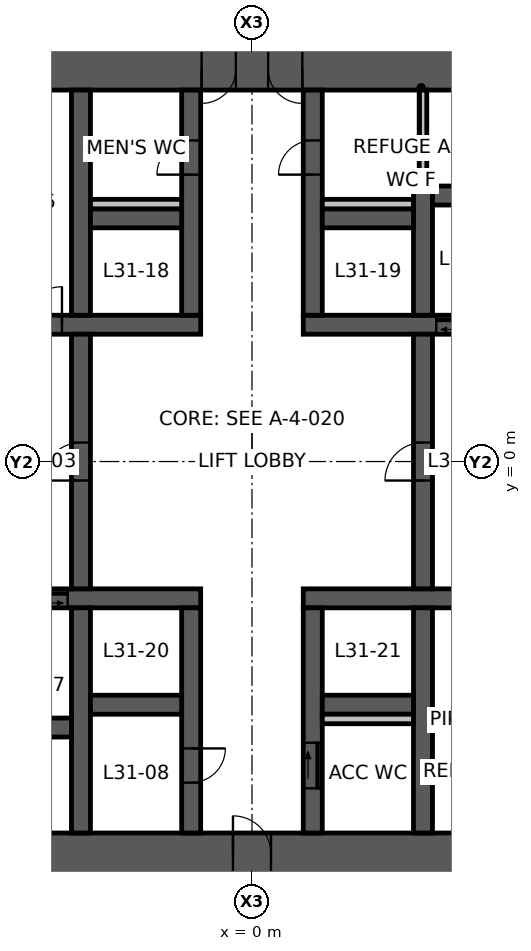
"""IFC4 building model, lengths in metres.
Left out: names, types, materials, properties, quantities, classifications, styles, units other than length and angle.
Written with IfcOpenShell. Run it as: python <this file> out.ifc"""

import sys

from ifc_helpers import new_model, si_unit, direction, frame, frame_2d, origin, place, context, subcontext, project, spatial, polyline, rectangle, outline, extrude, element, fill, save


model = new_model("IFC4")
c1 = context("Model", 3, precision=1e-05, world=origin(), true_north=direction((0.0, 1.0)))
c2 = subcontext(c1, "Body", "Model", "MODEL_VIEW")
j1 = project(units=[si_unit("LENGTHUNIT", "METRE"), si_unit("PLANEANGLEUNIT", "RADIAN")], contexts=[c1])
p1 = place(None, origin())
s1 = spatial("IfcSite", under=j1, at=p1, CompositionType="ELEMENT")
p2 = place(p1, origin())
s2 = spatial("IfcBuilding", under=s1, at=p2, CompositionType="ELEMENT")
p3 = place(p2, frame((0.0, 0.0, 123.6)))
s3 = spatial("IfcBuildingStorey", under=s2, at=p3, CompositionType="ELEMENT", Elevation=123.6)
p4 = place(p3, frame((5.961, 10.325, 0.0), z_axis=(0.0, 0.0, 1.0), x_axis=(-1.0, 0.0, 0.0)))
e1 = element("IfcWall", 1, at=p4, inside=s3, PredefinedType="SHEAR", context=c2, shape_type="SweptSolid", body=[
    extrude(outline(polyline([(-0.318, -0.55), (4.636, -0.55), (5.536, -0.55), (6.386, -0.55), (7.286, -0.55), (12.24, -0.55), (11.605, 0.55), (7.286, 0.55), (6.386, 0.55), (5.536, 0.55), (4.636, 0.55), (0.318, 0.55), (-0.318, -0.55)])), origin(), (0.0, 0.0, 1.0), 5.0),
])
p5 = place(p4, frame((6.386, 0.0, 0.0)))
e2 = element("IfcOpeningElement", 2, at=p5, cuts=e1, PredefinedType="OPENING", context=c2, shape_type="SweptSolid", body=[
    extrude(rectangle(XDim=0.9, YDim=2.1, at=frame_2d((0.45, 1.05))), frame((0.0, 0.56, 0.0), z_axis=(0.0, -1.0, 0.0), x_axis=(1.0, 0.0, 0.0)), (0.0, 0.0, 1.0), 1.12),
])
p6 = place(p4, frame((4.636, 0.0, 0.0)))
e3 = element("IfcOpeningElement", 3, at=p6, cuts=e1, PredefinedType="OPENING", context=c2, shape_type="SweptSolid", body=[
    extrude(rectangle(XDim=0.9, YDim=2.1, at=frame_2d((0.45, 1.05))), frame((0.0, 0.56, 0.0), z_axis=(0.0, -1.0, 0.0), x_axis=(1.0, 0.0, 0.0)), (0.0, 0.0, 1.0), 1.12),
])
p7 = place(p3, frame((-5.961, -10.325, 0.0), z_axis=(0.0, 0.0, 1.0), x_axis=(1.0, 0.0, 0.0)))
e4 = element("IfcWall", 4, at=p7, inside=s3, PredefinedType="SHEAR", context=c2, shape_type="SweptSolid", body=[
    extrude(outline(polyline([(-0.318, -0.55), (5.461, -0.55), (6.461, -0.55), (12.24, -0.55), (11.605, 0.55), (6.461, 0.55), (5.461, 0.55), (0.318, 0.55), (-0.318, -0.55)])), origin(), (0.0, 0.0, 1.0), 5.0),
])
p8 = place(p7, frame((5.461, 0.0, 0.0)))
e5 = element("IfcOpeningElement", 5, at=p8, cuts=e4, PredefinedType="OPENING", context=c2, shape_type="SweptSolid", body=[
    extrude(rectangle(XDim=1.0, YDim=2.1, at=frame_2d((0.5, 1.05))), frame((0.0, 0.56, 0.0), z_axis=(0.0, -1.0, 0.0), x_axis=(1.0, 0.0, 0.0)), (0.0, 0.0, 1.0), 1.12),
])
p9 = place(p3, frame((-9.209, 3.6, 0.0), z_axis=(0.0, 0.0, 1.0), x_axis=(1.0, 0.0, 0.0)))
e6 = element("IfcWall", 6, at=p9, inside=s3, PredefinedType="SHEAR", context=c2, shape_type="SweptSolid", body=[
    extrude(outline(polyline([(-0.144, -0.25), (3.209, -0.25), (4.209, -0.25), (7.859, -0.25), (7.859, 0.25), (4.209, 0.25), (3.209, 0.25), (0.144, 0.25), (-0.144, -0.25)])), origin(), (0.0, 0.0, 1.0), 5.0),
])
p10 = place(p9, frame((3.209, 0.0, 0.0)))
e7 = element("IfcOpeningElement", 7, at=p10, cuts=e6, PredefinedType="OPENING", context=c2, shape_type="SweptSolid", body=[
    extrude(rectangle(XDim=1.0, YDim=2.1, at=frame_2d((0.5, 1.05))), frame((0.0, 0.26, 0.0), z_axis=(0.0, -1.0, 0.0), x_axis=(1.0, 0.0, 0.0)), (0.0, 0.0, 1.0), 0.52),
])
p11 = place(p3, frame((1.35, 3.6, 0.0), z_axis=(0.0, 0.0, 1.0), x_axis=(1.0, 0.0, 0.0)))
e8 = element("IfcWall", 8, at=p11, inside=s3, PredefinedType="SHEAR", context=c2, shape_type="SweptSolid", body=[
    extrude(outline(polyline([(0.0, -0.25), (3.5, -0.25), (4.8, -0.25), (8.003, -0.25), (7.714, 0.25), (4.8, 0.25), (3.5, 0.25), (0.0, 0.25), (0.0, -0.25)])), origin(), (0.0, 0.0, 1.0), 5.0),
])
p12 = place(p11, frame((3.5, 0.0, 0.0)))
e9 = element("IfcOpeningElement", 9, at=p12, cuts=e8, PredefinedType="OPENING", context=c2, shape_type="SweptSolid", body=[
    extrude(rectangle(XDim=1.3, YDim=2.1, at=frame_2d((0.65, 1.05))), frame((0.0, 0.26, 0.0), z_axis=(0.0, -1.0, 0.0), x_axis=(1.0, 0.0, 0.0)), (0.0, 0.0, 1.0), 0.52),
])
p13 = place(p3, frame((-9.209, -3.6, 0.0), z_axis=(0.0, 0.0, 1.0), x_axis=(1.0, 0.0, 0.0)))
e10 = element("IfcWall", 10, at=p13, inside=s3, PredefinedType="SHEAR", context=c2, shape_type="SweptSolid", body=[
    extrude(outline(polyline([(0.144, -0.25), (3.059, -0.25), (4.359, -0.25), (7.859, -0.25), (7.859, 0.25), (4.359, 0.25), (3.059, 0.25), (-0.144, 0.25), (0.144, -0.25)])), origin(), (0.0, 0.0, 1.0), 5.0),
])
p14 = place(p13, frame((3.059, 0.0, 0.0)))
e11 = element("IfcOpeningElement", 11, at=p14, cuts=e10, PredefinedType="OPENING", context=c2, shape_type="SweptSolid", body=[
    extrude(rectangle(XDim=1.3, YDim=2.1, at=frame_2d((0.65, 1.05))), frame((0.0, 0.26, 0.0), z_axis=(0.0, -1.0, 0.0), x_axis=(1.0, 0.0, 0.0)), (0.0, 0.0, 1.0), 0.52),
])
p15 = place(p3, frame((1.35, -3.6, 0.0), z_axis=(0.0, 0.0, 1.0), x_axis=(1.0, 0.0, 0.0)))
e12 = element("IfcWall", 12, at=p15, inside=s3, PredefinedType="SHEAR", context=c2, shape_type="SweptSolid", body=[
    extrude(outline(polyline([(0.0, -0.25), (7.714, -0.25), (8.003, 0.25), (0.0, 0.25), (0.0, -0.25)])), origin(), (0.0, 0.0, 1.0), 5.0),
])
p16 = place(p3, frame((-1.6, 3.85, 0.0), z_axis=(0.0, 0.0, 1.0), x_axis=(0.0, 1.0, 0.0)))
e13 = element("IfcWall", 13, at=p16, inside=s3, PredefinedType="SHEAR", context=c2, shape_type="SweptSolid", body=[
    extrude(rectangle(XDim=5.925, YDim=0.5, at=frame_2d((2.962, 0.0))), origin(), (0.0, 0.0, 1.0), 5.0),
])
p17 = place(p16, frame((3.7, 0.0, 0.0)))
e14 = element("IfcOpeningElement", 14, at=p17, cuts=e13, PredefinedType="OPENING", context=c2, shape_type="SweptSolid", body=[
    extrude(rectangle(XDim=0.9, YDim=2.1, at=frame_2d((0.45, 1.05))), frame((0.0, 0.26, 0.0), z_axis=(0.0, -1.0, 0.0), x_axis=(1.0, 0.0, 0.0)), (0.0, 0.0, 1.0), 0.52),
])
p18 = place(p3, frame((1.6, 3.85, 0.0), z_axis=(0.0, 0.0, 1.0), x_axis=(0.0, 1.0, 0.0)))
e15 = element("IfcWall", 15, at=p18, inside=s3, PredefinedType="SHEAR", context=c2, shape_type="SweptSolid", body=[
    extrude(rectangle(XDim=5.925, YDim=0.5, at=frame_2d((2.962, 0.0))), origin(), (0.0, 0.0, 1.0), 5.0),
])
p19 = place(p18, frame((3.7, 0.0, 0.0)))
e16 = element("IfcOpeningElement", 16, at=p19, cuts=e15, PredefinedType="OPENING", context=c2, shape_type="SweptSolid", body=[
    extrude(rectangle(XDim=0.9, YDim=2.1, at=frame_2d((0.45, 1.05))), frame((0.0, 0.26, 0.0), z_axis=(0.0, -1.0, 0.0), x_axis=(1.0, 0.0, 0.0)), (0.0, 0.0, 1.0), 0.52),
])
p20 = place(p3, frame((-1.6, -3.85, 0.0), z_axis=(0.0, 0.0, 1.0), x_axis=(0.0, -1.0, 0.0)))
e17 = element("IfcWall", 17, at=p20, inside=s3, PredefinedType="SHEAR", context=c2, shape_type="SweptSolid", body=[
    extrude(rectangle(XDim=5.925, YDim=0.5, at=frame_2d((2.962, 0.0))), origin(), (0.0, 0.0, 1.0), 5.0),
])
p21 = place(p20, frame((3.7, 0.0, 0.0)))
e18 = element("IfcOpeningElement", 18, at=p21, cuts=e17, PredefinedType="OPENING", context=c2, shape_type="SweptSolid", body=[
    extrude(rectangle(XDim=0.9, YDim=2.1, at=frame_2d((0.45, 1.05))), frame((0.0, 0.26, 0.0), z_axis=(0.0, -1.0, 0.0), x_axis=(1.0, 0.0, 0.0)), (0.0, 0.0, 1.0), 0.52),
])
p22 = place(p3, frame((1.6, -3.85, 0.0), z_axis=(0.0, 0.0, 1.0), x_axis=(0.0, -1.0, 0.0)))
e19 = element("IfcWall", 19, at=p22, inside=s3, PredefinedType="SHEAR", context=c2, shape_type="SweptSolid", body=[
    extrude(rectangle(XDim=5.925, YDim=0.5, at=frame_2d((2.962, 0.0))), origin(), (0.0, 0.0, 1.0), 5.0),
])
p23 = place(p22, frame((3.55, 0.0, 0.0)))
e20 = element("IfcOpeningElement", 20, at=p23, cuts=e19, PredefinedType="OPENING", context=c2, shape_type="SweptSolid", body=[
    extrude(rectangle(XDim=1.2, YDim=2.1, at=frame_2d((0.6, 1.05))), frame((0.0, 0.26, 0.0), z_axis=(0.0, -1.0, 0.0), x_axis=(1.0, 0.0, 0.0)), (0.0, 0.0, 1.0), 0.52),
])
p24 = place(p3, frame((-4.5, -3.35, 0.0), z_axis=(0.0, 0.0, 1.0), x_axis=(0.0, 1.0, 0.0)))
e21 = element("IfcWall", 21, at=p24, inside=s3, PredefinedType="SHEAR", context=c2, shape_type="SweptSolid", body=[
    extrude(rectangle(XDim=6.7, YDim=0.5, at=frame_2d((3.35, 0.0))), origin(), (0.0, 0.0, 1.0), 5.0),
])
p25 = place(p24, frame((2.85, 0.0, 0.0)))
e22 = element("IfcOpeningElement", 22, at=p25, cuts=e21, PredefinedType="OPENING", context=c2, shape_type="SweptSolid", body=[
    extrude(rectangle(XDim=1.0, YDim=2.1, at=frame_2d((0.5, 1.05))), frame((0.0, 0.26, 0.0), z_axis=(0.0, -1.0, 0.0), x_axis=(1.0, 0.0, 0.0)), (0.0, 0.0, 1.0), 0.52),
])
p26 = place(p3, frame((4.5, -3.35, 0.0), z_axis=(0.0, 0.0, 1.0), x_axis=(0.0, 1.0, 0.0)))
e23 = element("IfcWall", 23, at=p26, inside=s3, PredefinedType="SHEAR", context=c2, shape_type="SweptSolid", body=[
    extrude(rectangle(XDim=6.7, YDim=0.5, at=frame_2d((3.35, 0.0))), origin(), (0.0, 0.0, 1.0), 5.0),
])
p27 = place(p26, frame((2.85, 0.0, 0.0)))
e24 = element("IfcOpeningElement", 24, at=p27, cuts=e23, PredefinedType="OPENING", context=c2, shape_type="SweptSolid", body=[
    extrude(rectangle(XDim=1.0, YDim=2.1, at=frame_2d((0.5, 1.05))), frame((0.0, 0.26, 0.0), z_axis=(0.0, -1.0, 0.0), x_axis=(1.0, 0.0, 0.0)), (0.0, 0.0, 1.0), 0.52),
])
p28 = place(p3, frame((-4.5, 3.85, 0.0), z_axis=(0.0, 0.0, 1.0), x_axis=(0.0, 1.0, 0.0)))
e25 = element("IfcWall", 25, at=p28, inside=s3, PredefinedType="SHEAR", context=c2, shape_type="SweptSolid", body=[
    extrude(rectangle(XDim=5.925, YDim=0.5, at=frame_2d((2.962, 0.0))), origin(), (0.0, 0.0, 1.0), 5.0),
])
p29 = place(p3, frame((4.5, 3.85, 0.0), z_axis=(0.0, 0.0, 1.0), x_axis=(0.0, 1.0, 0.0)))
e26 = element("IfcWall", 26, at=p29, inside=s3, PredefinedType="SHEAR", context=c2, shape_type="SweptSolid", body=[
    extrude(rectangle(XDim=3.4, YDim=0.5, at=frame_2d((1.7, 0.0))), origin(), (0.0, 0.0, 1.0), 5.0),
])
for number, where, z_axis, x_axis in (
    (27, (-4.5, -3.85, 0.0), (0.0, 0.0, 1.0), (0.0, -1.0, 0.0)),
    (28, (4.5, -3.85, 0.0), (0.0, 0.0, 1.0), (0.0, -1.0, 0.0)),
):
    element("IfcWall", number, at=place(p3, frame(where, z_axis=z_axis, x_axis=x_axis)), inside=s3, PredefinedType="SHEAR", context=c2, shape_type="SweptSolid", body=[
        extrude(rectangle(XDim=5.925, YDim=0.5, at=frame_2d((2.962, 0.0))), origin(), (0.0, 0.0, 1.0), 5.0),
    ])
for number, where, z_axis, x_axis in (
    (29, (-4.25, 6.4, 0.0), (0.0, 0.0, 1.0), (1.0, 0.0, 0.0)),
    (30, (1.85, 6.4, 0.0), (0.0, 0.0, 1.0), (1.0, 0.0, 0.0)),
    (31, (-4.25, -6.4, 0.0), (0.0, 0.0, 1.0), (1.0, 0.0, 0.0)),
    (32, (1.85, -6.4, 0.0), (0.0, 0.0, 1.0), (1.0, 0.0, 0.0)),
):
    element("IfcWall", number, at=place(p3, frame(where, z_axis=z_axis, x_axis=x_axis)), inside=s3, PredefinedType="SHEAR", context=c2, shape_type="SweptSolid", body=[
        extrude(rectangle(XDim=2.4, YDim=0.5, at=frame_2d((1.2, 0.0))), origin(), (0.0, 0.0, 1.0), 5.0),
    ])
for number, where, z_axis, x_axis in (
    (33, (-6.85, -7.0, 0.0), (0.0, 0.0, 1.0), (1.0, 0.0, 0.0)),
    (34, (4.75, 7.0, 0.0), (0.0, 0.0, 1.0), (1.0, 0.0, 0.0)),
):
    element("IfcWall", number, at=place(p3, frame(where, z_axis=z_axis, x_axis=x_axis)), inside=s3, PredefinedType="SHEAR", context=c2, shape_type="SweptSolid", body=[
        extrude(rectangle(XDim=2.1, YDim=0.5, at=frame_2d((1.05, 0.0))), origin(), (0.0, 0.0, 1.0), 5.0),
    ])
p30 = place(p3, frame((4.5, 7.25, 0.0), z_axis=(0.0, 0.0, 1.0), x_axis=(0.0, 1.0, 0.0)))
e35 = element("IfcWall", 35, at=p30, inside=s3, PredefinedType="STANDARD", context=c2, shape_type="SweptSolid", body=[
    extrude(rectangle(XDim=2.525, YDim=0.2, at=frame_2d((1.262, 0.0))), origin(), (0.0, 0.0, 1.0), 5.0),
])
for number, where, z_axis, x_axis in (
    (36, (-4.25, 6.775, 0.0), (0.0, 0.0, 1.0), (1.0, 0.0, 0.0)),
    (37, (1.85, 6.775, 0.0), (0.0, 0.0, 1.0), (1.0, 0.0, 0.0)),
    (38, (1.85, -6.775, 0.0), (0.0, 0.0, 1.0), (1.0, 0.0, 0.0)),
):
    element("IfcWall", number, at=place(p3, frame(where, z_axis=z_axis, x_axis=x_axis)), inside=s3, PredefinedType="PLUMBINGWALL", context=c2, shape_type="SweptSolid", body=[
        extrude(rectangle(XDim=2.4, YDim=0.25, at=frame_2d((1.2, 0.0))), origin(), (0.0, 0.0, 1.0), 5.0),
    ])
p31 = place(p5, origin())
e39 = element("IfcDoor", 39, at=p31, inside=s3, OperationType="SINGLE_SWING_RIGHT", PredefinedType="DOOR", context=c2, shape_type="SweptSolid", body=[
    extrude(rectangle(XDim=0.9, YDim=2.1, at=frame_2d((0.45, 1.05))), frame((0.0, 0.025, 0.0), z_axis=(0.0, -1.0, 0.0), x_axis=(1.0, 0.0, 0.0)), (0.0, 0.0, 1.0), 0.05),
])
fill(e2, e39)
p32 = place(p6, origin())
e40 = element("IfcDoor", 40, at=p32, inside=s3, OperationType="SINGLE_SWING_LEFT", PredefinedType="DOOR", context=c2, shape_type="SweptSolid", body=[
    extrude(rectangle(XDim=0.9, YDim=2.1, at=frame_2d((0.45, 1.05))), frame((0.0, 0.025, 0.0), z_axis=(0.0, -1.0, 0.0), x_axis=(1.0, 0.0, 0.0)), (0.0, 0.0, 1.0), 0.05),
])
fill(e3, e40)
p33 = place(p8, origin())
e41 = element("IfcDoor", 41, at=p33, inside=s3, OperationType="SINGLE_SWING_LEFT", PredefinedType="DOOR", context=c2, shape_type="SweptSolid", body=[
    extrude(rectangle(XDim=1.0, YDim=2.1, at=frame_2d((0.5, 1.05))), frame((0.0, 0.025, 0.0), z_axis=(0.0, -1.0, 0.0), x_axis=(1.0, 0.0, 0.0)), (0.0, 0.0, 1.0), 0.05),
])
fill(e5, e41)
p34 = place(p27, origin())
e42 = element("IfcDoor", 42, at=p34, inside=s3, OperationType="SINGLE_SWING_LEFT", PredefinedType="DOOR", context=c2, shape_type="SweptSolid", body=[
    extrude(rectangle(XDim=1.0, YDim=2.1, at=frame_2d((0.5, 1.05))), frame((0.0, 0.025, 0.0), z_axis=(0.0, -1.0, 0.0), x_axis=(1.0, 0.0, 0.0)), (0.0, 0.0, 1.0), 0.05),
])
fill(e24, e42)
p35 = place(p25, origin())
e43 = element("IfcDoor", 43, at=p35, inside=s3, OperationType="SINGLE_SWING_LEFT", PredefinedType="DOOR", context=c2, shape_type="SweptSolid", body=[
    extrude(rectangle(XDim=1.0, YDim=2.1, at=frame_2d((0.5, 1.05))), frame((0.0, 0.025, 0.0), z_axis=(0.0, -1.0, 0.0), x_axis=(1.0, 0.0, 0.0)), (0.0, 0.0, 1.0), 0.05),
])
fill(e22, e43)
p36 = place(p10, origin())
e44 = element("IfcDoor", 44, at=p36, inside=s3, OperationType="SINGLE_SWING_RIGHT", PredefinedType="DOOR", context=c2, shape_type="SweptSolid", body=[
    extrude(rectangle(XDim=1.0, YDim=2.1, at=frame_2d((0.5, 1.05))), frame((0.0, 0.025, 0.0), z_axis=(0.0, -1.0, 0.0), x_axis=(1.0, 0.0, 0.0)), (0.0, 0.0, 1.0), 0.05),
])
fill(e7, e44)
p37 = place(p17, origin())
e45 = element("IfcDoor", 45, at=p37, inside=s3, OperationType="SINGLE_SWING_LEFT", PredefinedType="DOOR", context=c2, shape_type="SweptSolid", body=[
    extrude(rectangle(XDim=0.9, YDim=2.1, at=frame_2d((0.45, 1.05))), frame((0.0, 0.025, 0.0), z_axis=(0.0, -1.0, 0.0), x_axis=(1.0, 0.0, 0.0)), (0.0, 0.0, 1.0), 0.05),
])
fill(e14, e45)
p38 = place(p19, origin())
e46 = element("IfcDoor", 46, at=p38, inside=s3, OperationType="SINGLE_SWING_LEFT", PredefinedType="DOOR", context=c2, shape_type="SweptSolid", body=[
    extrude(rectangle(XDim=0.9, YDim=2.1, at=frame_2d((0.45, 1.05))), frame((0.0, 0.025, 0.0), z_axis=(0.0, -1.0, 0.0), x_axis=(1.0, 0.0, 0.0)), (0.0, 0.0, 1.0), 0.05),
])
fill(e16, e46)
p39 = place(p23, origin())
e47 = element("IfcDoor", 47, at=p39, inside=s3, OperationType="SLIDING_TO_LEFT", PredefinedType="DOOR", context=c2, shape_type="SweptSolid", body=[
    extrude(rectangle(XDim=1.2, YDim=2.1, at=frame_2d((0.6, 1.05))), frame((0.0, 0.025, 0.0), z_axis=(0.0, -1.0, 0.0), x_axis=(1.0, 0.0, 0.0)), (0.0, 0.0, 1.0), 0.05),
])
fill(e20, e47)
p40 = place(p21, origin())
e48 = element("IfcDoor", 48, at=p40, inside=s3, OperationType="SINGLE_SWING_LEFT", PredefinedType="DOOR", context=c2, shape_type="SweptSolid", body=[
    extrude(rectangle(XDim=0.9, YDim=2.1, at=frame_2d((0.45, 1.05))), frame((0.0, 0.025, 0.0), z_axis=(0.0, -1.0, 0.0), x_axis=(1.0, 0.0, 0.0)), (0.0, 0.0, 1.0), 0.05),
])
fill(e18, e48)
p41 = place(p12, origin())
e49 = element("IfcDoor", 49, at=p41, inside=s3, OperationType="DOUBLE_DOOR_SLIDING", PredefinedType="DOOR", context=c2, shape_type="SweptSolid", body=[
    extrude(rectangle(XDim=1.3, YDim=2.1, at=frame_2d((0.65, 1.05))), frame((0.0, 0.025, 0.0), z_axis=(0.0, -1.0, 0.0), x_axis=(1.0, 0.0, 0.0)), (0.0, 0.0, 1.0), 0.05),
])
fill(e9, e49)
p42 = place(p14, origin())
e50 = element("IfcDoor", 50, at=p42, inside=s3, OperationType="DOUBLE_DOOR_SLIDING", PredefinedType="DOOR", context=c2, shape_type="SweptSolid", body=[
    extrude(rectangle(XDim=1.3, YDim=2.1, at=frame_2d((0.65, 1.05))), frame((0.0, 0.025, 0.0), z_axis=(0.0, -1.0, 0.0), x_axis=(1.0, 0.0, 0.0)), (0.0, 0.0, 1.0), 0.05),
])
fill(e11, e50)
save(model, sys.argv[1])
